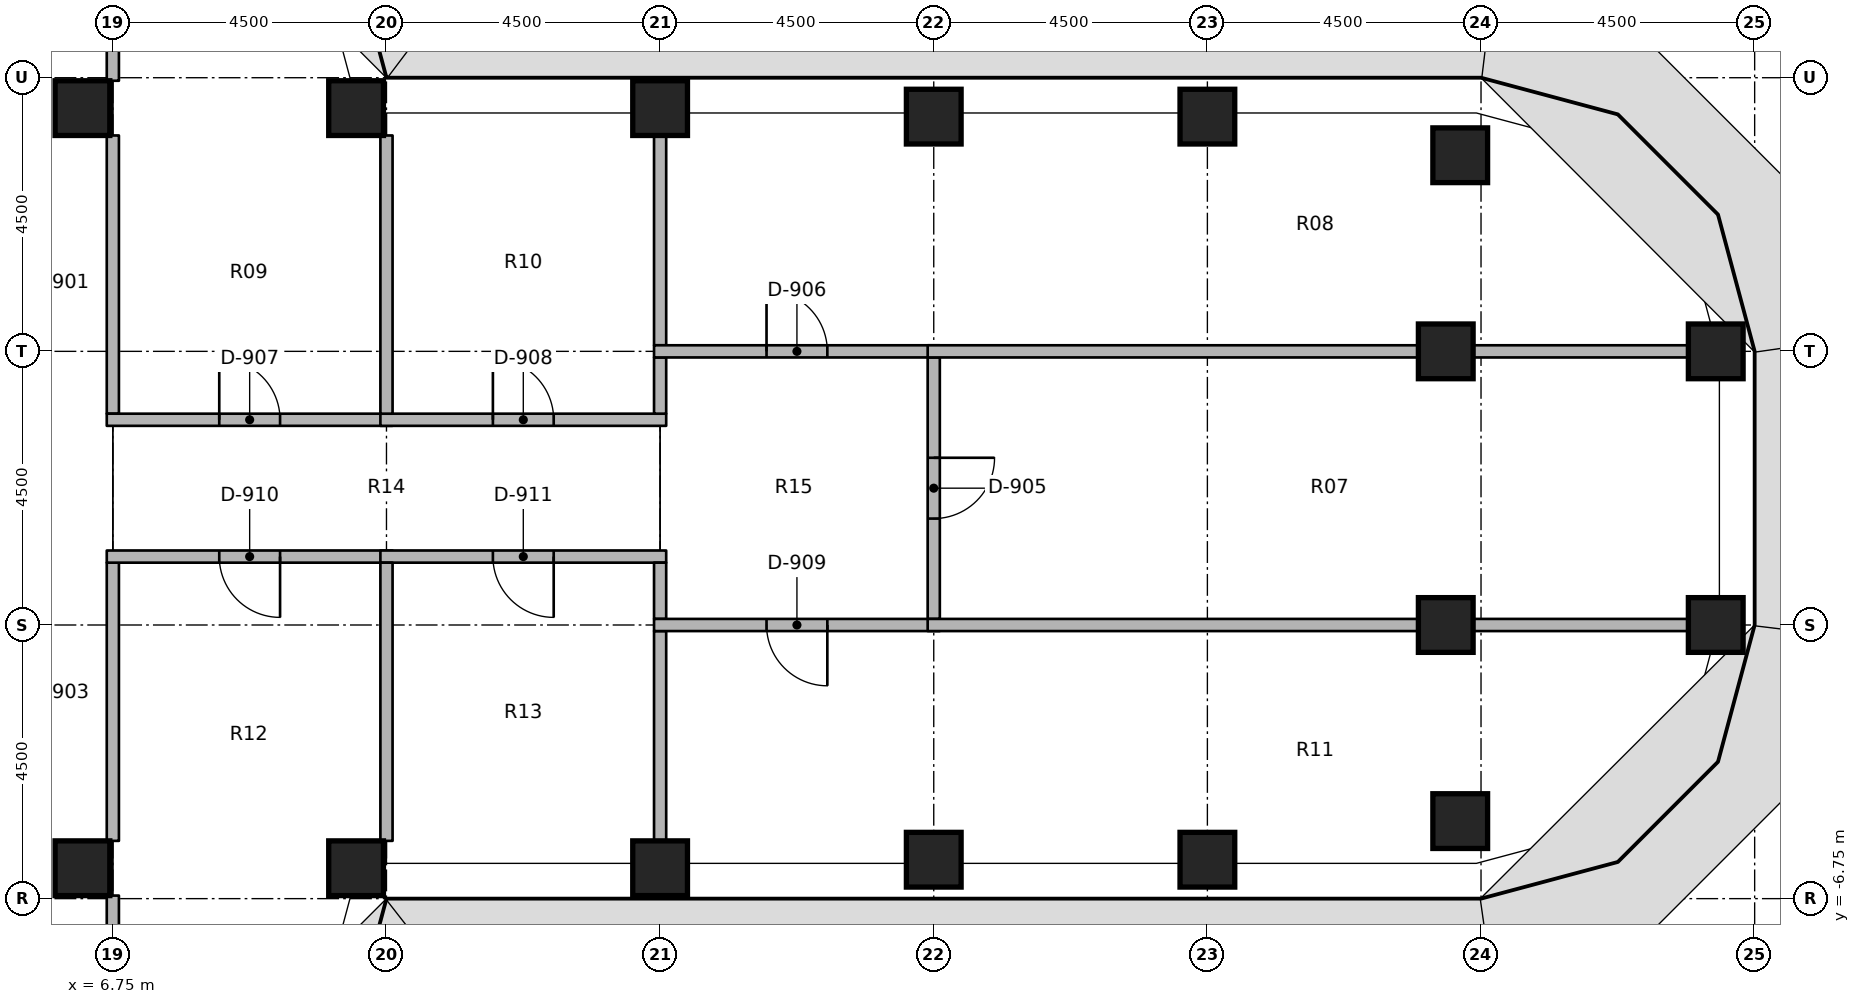
"""IFC4 building model, lengths in metres.
Left out: names, types, materials, properties, quantities, classifications, styles, units other than length and angle.
Written with IfcOpenShell. Run it as: python <this file> out.ifc"""

import sys

from ifc_helpers import new_model, si_unit, direction, frame, frame_2d, origin, origin_2d, place, context, subcontext, project, spatial, rectangle, extrude, element, fill, save


model = new_model("IFC4")
c1 = context("Model", 3, precision=1e-05, world=origin(), true_north=direction((0.0, 1.0)))
c2 = subcontext(c1, "Body", "Model", "MODEL_VIEW")
j1 = project(units=[si_unit("LENGTHUNIT", "METRE"), si_unit("PLANEANGLEUNIT", "RADIAN")], contexts=[c1])
p1 = place(None, origin())
s1 = spatial("IfcSite", under=j1, at=p1, CompositionType="ELEMENT")
p2 = place(p1, origin())
s2 = spatial("IfcBuilding", under=s1, at=p2, CompositionType="ELEMENT")
p3 = place(p2, frame((0.0, 0.0, 109.4)))
s3 = spatial("IfcBuildingStorey", under=s2, at=p3, CompositionType="ELEMENT", Elevation=109.4)
for number, where, z_axis, x_axis in (
    (1, (6.25, -6.25, 0.0), (0.0, 0.0, 1.0), (1.0, 0.0, 0.0)),
    (2, (6.25, 6.25, 0.0), (0.0, 0.0, 1.0), (1.0, 0.0, 0.0)),
    (3, (10.75, -6.25, 0.0), (0.0, 0.0, 1.0), (1.0, 0.0, 0.0)),
    (4, (10.75, 6.25, 0.0), (0.0, 0.0, 1.0), (1.0, 0.0, 0.0)),
    (5, (15.75, -6.25, 0.0), (0.0, 0.0, 1.0), (1.0, 0.0, 0.0)),
    (6, (15.75, 6.25, 0.0), (0.0, 0.0, 1.0), (1.0, 0.0, 0.0)),
    (7, (20.25, -6.11, 0.0), (0.0, 0.0, 1.0), (1.0, 0.0, 0.0)),
    (8, (20.25, 6.11, 0.0), (0.0, 0.0, 1.0), (1.0, 0.0, 0.0)),
    (9, (24.75, -6.11, 0.0), (0.0, 0.0, 1.0), (1.0, 0.0, 0.0)),
    (10, (24.75, 6.11, 0.0), (0.0, 0.0, 1.0), (1.0, 0.0, 0.0)),
    (11, (28.908, -5.475, 0.0), (0.0, 0.0, 1.0), (1.0, 0.0, 0.0)),
    (12, (28.67, -2.25, 0.0), (0.0, 0.0, 1.0), (1.0, 0.0, 0.0)),
    (13, (28.67, 2.25, 0.0), (0.0, 0.0, 1.0), (1.0, 0.0, 0.0)),
    (14, (28.908, 5.475, 0.0), (0.0, 0.0, 1.0), (1.0, 0.0, 0.0)),
    (15, (33.11, -2.25, 0.0), (0.0, 0.0, 1.0), (1.0, 0.0, 0.0)),
    (16, (33.11, 2.25, 0.0), (0.0, 0.0, 1.0), (1.0, 0.0, 0.0)),
):
    element("IfcColumn", number, at=place(p3, frame(where, z_axis=z_axis, x_axis=x_axis)), inside=s3, PredefinedType="COLUMN", context=c2, shape_type="SweptSolid", body=[
        extrude(rectangle(XDim=0.9, YDim=0.9, at=origin_2d()), origin(), (0.0, 0.0, 1.0), 3.65),
    ])
p4 = place(p3, frame((6.75, 1.225, 0.0), z_axis=(0.0, 0.0, 1.0), x_axis=(0.0, 1.0, 0.0)))
e17 = element("IfcWall", 17, at=p4, inside=s3, PredefinedType="PARTITIONING", context=c2, shape_type="SweptSolid", body=[
    extrude(rectangle(XDim=4.575, YDim=0.2, at=frame_2d((2.288, 0.0))), origin(), (0.0, 0.0, 1.0), 2.738),
])
for number, where, z_axis, x_axis in (
    (18, (6.75, 6.7, 0.0), (0.0, 0.0, 1.0), (0.0, 1.0, 0.0)),
    (19, (6.75, -10.3, 0.0), (0.0, 0.0, 1.0), (0.0, 1.0, 0.0)),
):
    element("IfcWall", number, at=place(p3, frame(where, z_axis=z_axis, x_axis=x_axis)), inside=s3, PredefinedType="PARTITIONING", context=c2, shape_type="SweptSolid", body=[
        extrude(rectangle(XDim=3.6, YDim=0.2, at=frame_2d((1.8, 0.0))), origin(), (0.0, 0.0, 1.0), 2.738),
    ])
p5 = place(p3, frame((6.75, -5.8, 0.0), z_axis=(0.0, 0.0, 1.0), x_axis=(0.0, 1.0, 0.0)))
e20 = element("IfcWall", 20, at=p5, inside=s3, PredefinedType="PARTITIONING", context=c2, shape_type="SweptSolid", body=[
    extrude(rectangle(XDim=4.575, YDim=0.2, at=frame_2d((2.288, 0.0))), origin(), (0.0, 0.0, 1.0), 2.738),
])
p6 = place(p3, frame((6.65, 1.125, 0.0), z_axis=(0.0, 0.0, 1.0), x_axis=(1.0, 0.0, 0.0)))
e21 = element("IfcWall", 21, at=p6, inside=s3, PredefinedType="PARTITIONING", context=c2, shape_type="SweptSolid", body=[
    extrude(rectangle(XDim=4.7, YDim=0.2, at=frame_2d((2.35, 0.0))), origin(), (0.0, 0.0, 1.0), 2.738),
])
p7 = place(p6, frame((1.85, 0.0, 0.0)))
e22 = element("IfcOpeningElement", 22, at=p7, cuts=e21, PredefinedType="OPENING", context=c2, shape_type="SweptSolid", body=[
    extrude(rectangle(XDim=1.0, YDim=2.1, at=frame_2d((0.5, 1.05))), frame((0.0, 0.11, 0.0), z_axis=(0.0, -1.0, 0.0), x_axis=(1.0, 0.0, 0.0)), (0.0, 0.0, 1.0), 0.22),
])
p8 = place(p3, frame((11.35, -1.125, 0.0), z_axis=(0.0, 0.0, 1.0), x_axis=(-1.0, 0.0, 0.0)))
e23 = element("IfcWall", 23, at=p8, inside=s3, PredefinedType="PARTITIONING", context=c2, shape_type="SweptSolid", body=[
    extrude(rectangle(XDim=4.7, YDim=0.2, at=frame_2d((2.35, 0.0))), origin(), (0.0, 0.0, 1.0), 2.738),
])
p9 = place(p8, frame((1.85, 0.0, 0.0)))
e24 = element("IfcOpeningElement", 24, at=p9, cuts=e23, PredefinedType="OPENING", context=c2, shape_type="SweptSolid", body=[
    extrude(rectangle(XDim=1.0, YDim=2.1, at=frame_2d((0.5, 1.05))), frame((0.0, 0.11, 0.0), z_axis=(0.0, -1.0, 0.0), x_axis=(1.0, 0.0, 0.0)), (0.0, 0.0, 1.0), 0.22),
])
p10 = place(p3, frame((11.15, 1.125, 0.0), z_axis=(0.0, 0.0, 1.0), x_axis=(1.0, 0.0, 0.0)))
e25 = element("IfcWall", 25, at=p10, inside=s3, PredefinedType="PARTITIONING", context=c2, shape_type="SweptSolid", body=[
    extrude(rectangle(XDim=4.7, YDim=0.2, at=frame_2d((2.35, 0.0))), origin(), (0.0, 0.0, 1.0), 2.738),
])
p11 = place(p10, frame((1.85, 0.0, 0.0)))
e26 = element("IfcOpeningElement", 26, at=p11, cuts=e25, PredefinedType="OPENING", context=c2, shape_type="SweptSolid", body=[
    extrude(rectangle(XDim=1.0, YDim=2.1, at=frame_2d((0.5, 1.05))), frame((0.0, 0.11, 0.0), z_axis=(0.0, -1.0, 0.0), x_axis=(1.0, 0.0, 0.0)), (0.0, 0.0, 1.0), 0.22),
])
p12 = place(p3, frame((15.85, -1.125, 0.0), z_axis=(0.0, 0.0, 1.0), x_axis=(-1.0, 0.0, 0.0)))
e27 = element("IfcWall", 27, at=p12, inside=s3, PredefinedType="PARTITIONING", context=c2, shape_type="SweptSolid", body=[
    extrude(rectangle(XDim=4.7, YDim=0.2, at=frame_2d((2.35, 0.0))), origin(), (0.0, 0.0, 1.0), 2.738),
])
p13 = place(p12, frame((1.85, 0.0, 0.0)))
e28 = element("IfcOpeningElement", 28, at=p13, cuts=e27, PredefinedType="OPENING", context=c2, shape_type="SweptSolid", body=[
    extrude(rectangle(XDim=1.0, YDim=2.1, at=frame_2d((0.5, 1.05))), frame((0.0, 0.11, 0.0), z_axis=(0.0, -1.0, 0.0), x_axis=(1.0, 0.0, 0.0)), (0.0, 0.0, 1.0), 0.22),
])
for number, where, z_axis, x_axis in (
    (29, (11.25, 1.225, 0.0), (0.0, 0.0, 1.0), (0.0, 1.0, 0.0)),
    (30, (11.25, -5.8, 0.0), (0.0, 0.0, 1.0), (0.0, 1.0, 0.0)),
):
    element("IfcWall", number, at=place(p3, frame(where, z_axis=z_axis, x_axis=x_axis)), inside=s3, PredefinedType="PARTITIONING", context=c2, shape_type="SweptSolid", body=[
        extrude(rectangle(XDim=4.575, YDim=0.2, at=frame_2d((2.288, 0.0))), origin(), (0.0, 0.0, 1.0), 2.738),
    ])
p14 = place(p3, frame((15.75, 1.225, 0.0), z_axis=(0.0, 0.0, 1.0), x_axis=(0.0, 1.0, 0.0)))
e31 = element("IfcWall", 31, at=p14, inside=s3, PredefinedType="PARTITIONING", context=c2, shape_type="SweptSolid", body=[
    extrude(rectangle(XDim=0.925, YDim=0.2, at=frame_2d((0.462, 0.0))), origin(), (0.0, 0.0, 1.0), 2.738),
])
p15 = place(p3, frame((15.75, 2.35, 0.0), z_axis=(0.0, 0.0, 1.0), x_axis=(0.0, 1.0, 0.0)))
e32 = element("IfcWall", 32, at=p15, inside=s3, PredefinedType="PARTITIONING", context=c2, shape_type="SweptSolid", body=[
    extrude(rectangle(XDim=3.45, YDim=0.2, at=frame_2d((1.725, 0.0))), origin(), (0.0, 0.0, 1.0), 2.738),
])
p16 = place(p3, frame((15.75, -2.15, 0.0), z_axis=(0.0, 0.0, 1.0), x_axis=(0.0, 1.0, 0.0)))
e33 = element("IfcWall", 33, at=p16, inside=s3, PredefinedType="PARTITIONING", context=c2, shape_type="SweptSolid", body=[
    extrude(rectangle(XDim=0.925, YDim=0.2, at=frame_2d((0.462, 0.0))), origin(), (0.0, 0.0, 1.0), 2.738),
])
p17 = place(p3, frame((15.75, -5.8, 0.0), z_axis=(0.0, 0.0, 1.0), x_axis=(0.0, 1.0, 0.0)))
e34 = element("IfcWall", 34, at=p17, inside=s3, PredefinedType="PARTITIONING", context=c2, shape_type="SweptSolid", body=[
    extrude(rectangle(XDim=3.45, YDim=0.2, at=frame_2d((1.725, 0.0))), origin(), (0.0, 0.0, 1.0), 2.738),
])
p18 = place(p3, frame((15.65, 2.25, 0.0), z_axis=(0.0, 0.0, 1.0), x_axis=(1.0, 0.0, 0.0)))
e35 = element("IfcWall", 35, at=p18, inside=s3, PredefinedType="PARTITIONING", context=c2, shape_type="SweptSolid", body=[
    extrude(rectangle(XDim=4.7, YDim=0.2, at=frame_2d((2.35, 0.0))), origin(), (0.0, 0.0, 1.0), 2.738),
])
p19 = place(p18, frame((1.85, 0.0, 0.0)))
e36 = element("IfcOpeningElement", 36, at=p19, cuts=e35, PredefinedType="OPENING", context=c2, shape_type="SweptSolid", body=[
    extrude(rectangle(XDim=1.0, YDim=2.1, at=frame_2d((0.5, 1.05))), frame((0.0, 0.11, 0.0), z_axis=(0.0, -1.0, 0.0), x_axis=(1.0, 0.0, 0.0)), (0.0, 0.0, 1.0), 0.22),
])
p20 = place(p3, frame((20.35, -2.25, 0.0), z_axis=(0.0, 0.0, 1.0), x_axis=(-1.0, 0.0, 0.0)))
e37 = element("IfcWall", 37, at=p20, inside=s3, PredefinedType="PARTITIONING", context=c2, shape_type="SweptSolid", body=[
    extrude(rectangle(XDim=4.7, YDim=0.2, at=frame_2d((2.35, 0.0))), origin(), (0.0, 0.0, 1.0), 2.738),
])
p21 = place(p20, frame((1.85, 0.0, 0.0)))
e38 = element("IfcOpeningElement", 38, at=p21, cuts=e37, PredefinedType="OPENING", context=c2, shape_type="SweptSolid", body=[
    extrude(rectangle(XDim=1.0, YDim=2.1, at=frame_2d((0.5, 1.05))), frame((0.0, 0.11, 0.0), z_axis=(0.0, -1.0, 0.0), x_axis=(1.0, 0.0, 0.0)), (0.0, 0.0, 1.0), 0.22),
])
p22 = place(p3, frame((20.25, 2.15, 0.0), z_axis=(0.0, 0.0, 1.0), x_axis=(0.0, -1.0, 0.0)))
e39 = element("IfcWall", 39, at=p22, inside=s3, PredefinedType="PARTITIONING", context=c2, shape_type="SweptSolid", body=[
    extrude(rectangle(XDim=4.3, YDim=0.2, at=frame_2d((2.15, 0.0))), origin(), (0.0, 0.0, 1.0), 2.738),
])
p23 = place(p22, frame((1.65, 0.0, 0.0)))
e40 = element("IfcOpeningElement", 40, at=p23, cuts=e39, PredefinedType="OPENING", context=c2, shape_type="SweptSolid", body=[
    extrude(rectangle(XDim=1.0, YDim=2.1, at=frame_2d((0.5, 1.05))), frame((0.0, 0.11, 0.0), z_axis=(0.0, -1.0, 0.0), x_axis=(1.0, 0.0, 0.0)), (0.0, 0.0, 1.0), 0.22),
])
p24 = place(p3, frame((20.15, 2.25, 0.0), z_axis=(0.0, 0.0, 1.0), x_axis=(1.0, 0.0, 0.0)))
e41 = element("IfcWall", 41, at=p24, inside=s3, PredefinedType="PARTITIONING", context=c2, shape_type="SweptSolid", body=[
    extrude(rectangle(XDim=8.07, YDim=0.2, at=frame_2d((4.035, 0.0))), origin(), (0.0, 0.0, 1.0), 2.738),
])
p25 = place(p3, frame((29.12, 2.25, 0.0), z_axis=(0.0, 0.0, 1.0), x_axis=(1.0, 0.0, 0.0)))
e42 = element("IfcWall", 42, at=p25, inside=s3, PredefinedType="PARTITIONING", context=c2, shape_type="SweptSolid", body=[
    extrude(rectangle(XDim=3.54, YDim=0.2, at=frame_2d((1.77, 0.0))), origin(), (0.0, 0.0, 1.0), 2.738),
])
p26 = place(p3, frame((20.15, -2.25, 0.0), z_axis=(0.0, 0.0, 1.0), x_axis=(1.0, 0.0, 0.0)))
e43 = element("IfcWall", 43, at=p26, inside=s3, PredefinedType="PARTITIONING", context=c2, shape_type="SweptSolid", body=[
    extrude(rectangle(XDim=8.07, YDim=0.2, at=frame_2d((4.035, 0.0))), origin(), (0.0, 0.0, 1.0), 2.738),
])
p27 = place(p3, frame((29.12, -2.25, 0.0), z_axis=(0.0, 0.0, 1.0), x_axis=(1.0, 0.0, 0.0)))
e44 = element("IfcWall", 44, at=p27, inside=s3, PredefinedType="PARTITIONING", context=c2, shape_type="SweptSolid", body=[
    extrude(rectangle(XDim=3.54, YDim=0.2, at=frame_2d((1.77, 0.0))), origin(), (0.0, 0.0, 1.0), 2.738),
])
p28 = place(p23, origin())
e45 = element("IfcDoor", 45, at=p28, inside=s3, OperationType="SINGLE_SWING_RIGHT", PredefinedType="DOOR", context=c2, shape_type="SweptSolid", body=[
    extrude(rectangle(XDim=1.0, YDim=2.1, at=frame_2d((0.5, 1.05))), frame((0.0, 0.025, 0.0), z_axis=(0.0, -1.0, 0.0), x_axis=(1.0, 0.0, 0.0)), (0.0, 0.0, 1.0), 0.05),
])
fill(e40, e45)
p29 = place(p19, origin())
e46 = element("IfcDoor", 46, at=p29, inside=s3, OperationType="SINGLE_SWING_LEFT", PredefinedType="DOOR", context=c2, shape_type="SweptSolid", body=[
    extrude(rectangle(XDim=1.0, YDim=2.1, at=frame_2d((0.5, 1.05))), frame((0.0, 0.025, 0.0), z_axis=(0.0, -1.0, 0.0), x_axis=(1.0, 0.0, 0.0)), (0.0, 0.0, 1.0), 0.05),
])
fill(e36, e46)
p30 = place(p7, origin())
e47 = element("IfcDoor", 47, at=p30, inside=s3, OperationType="SINGLE_SWING_RIGHT", PredefinedType="DOOR", context=c2, shape_type="SweptSolid", body=[
    extrude(rectangle(XDim=1.0, YDim=2.1, at=frame_2d((0.5, 1.05))), frame((0.0, 0.025, 0.0), z_axis=(0.0, -1.0, 0.0), x_axis=(1.0, 0.0, 0.0)), (0.0, 0.0, 1.0), 0.05),
])
fill(e22, e47)
p31 = place(p11, origin())
e48 = element("IfcDoor", 48, at=p31, inside=s3, OperationType="SINGLE_SWING_RIGHT", PredefinedType="DOOR", context=c2, shape_type="SweptSolid", body=[
    extrude(rectangle(XDim=1.0, YDim=2.1, at=frame_2d((0.5, 1.05))), frame((0.0, 0.025, 0.0), z_axis=(0.0, -1.0, 0.0), x_axis=(1.0, 0.0, 0.0)), (0.0, 0.0, 1.0), 0.05),
])
fill(e26, e48)
p32 = place(p21, origin())
e49 = element("IfcDoor", 49, at=p32, inside=s3, OperationType="SINGLE_SWING_RIGHT", PredefinedType="DOOR", context=c2, shape_type="SweptSolid", body=[
    extrude(rectangle(XDim=1.0, YDim=2.1, at=frame_2d((0.5, 1.05))), frame((0.0, 0.025, 0.0), z_axis=(0.0, -1.0, 0.0), x_axis=(1.0, 0.0, 0.0)), (0.0, 0.0, 1.0), 0.05),
])
fill(e38, e49)
p33 = place(p9, origin())
e50 = element("IfcDoor", 50, at=p33, inside=s3, OperationType="SINGLE_SWING_RIGHT", PredefinedType="DOOR", context=c2, shape_type="SweptSolid", body=[
    extrude(rectangle(XDim=1.0, YDim=2.1, at=frame_2d((0.5, 1.05))), frame((0.0, 0.025, 0.0), z_axis=(0.0, -1.0, 0.0), x_axis=(1.0, 0.0, 0.0)), (0.0, 0.0, 1.0), 0.05),
])
fill(e24, e50)
p34 = place(p13, origin())
e51 = element("IfcDoor", 51, at=p34, inside=s3, OperationType="SINGLE_SWING_RIGHT", PredefinedType="DOOR", context=c2, shape_type="SweptSolid", body=[
    extrude(rectangle(XDim=1.0, YDim=2.1, at=frame_2d((0.5, 1.05))), frame((0.0, 0.025, 0.0), z_axis=(0.0, -1.0, 0.0), x_axis=(1.0, 0.0, 0.0)), (0.0, 0.0, 1.0), 0.05),
])
fill(e28, e51)
save(model, sys.argv[1])
